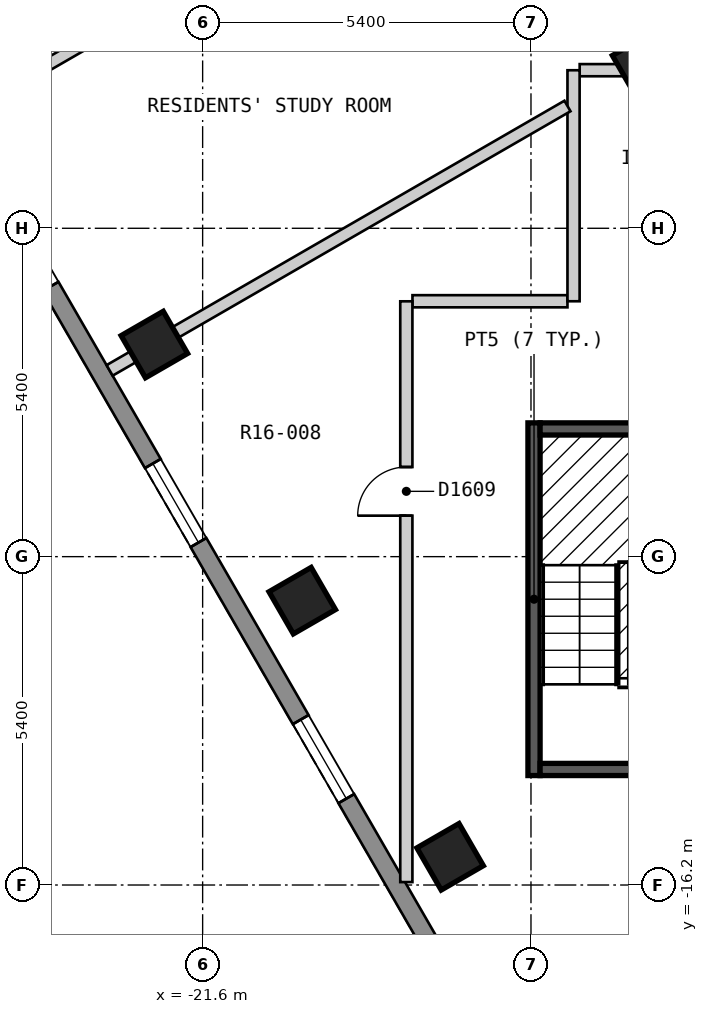
"""IFC4 building model, lengths in metres.
Left out: names, types, materials, properties, quantities, classifications, styles, units other than length and angle.
Written with IfcOpenShell. Run it as: python <this file> out.ifc"""

import sys

from ifc_helpers import new_model, si_unit, direction, frame, frame_2d, origin, origin_2d, place, context, subcontext, project, spatial, polyline, rectangle, outline, extrude, element, fill, save


model = new_model("IFC4")
c1 = context("Model", 3, precision=1e-05, world=origin(), true_north=direction((0.0, 1.0)))
c2 = subcontext(c1, "Body", "Model", "MODEL_VIEW")
j1 = project(units=[si_unit("LENGTHUNIT", "METRE"), si_unit("PLANEANGLEUNIT", "RADIAN")], contexts=[c1])
p1 = place(None, origin())
s1 = spatial("IfcSite", under=j1, at=p1, CompositionType="ELEMENT")
p2 = place(p1, origin())
s2 = spatial("IfcBuilding", under=s1, at=p2, CompositionType="ELEMENT")
p3 = place(p2, frame((0.0, 0.0, 163.2)))
s3 = spatial("IfcBuildingStorey", under=s2, at=p3, CompositionType="ELEMENT", Elevation=163.2)
for number, where, z_axis, x_axis in (
    (1, (-22.394, -7.312, 0.0), (0.0, 0.0, 1.0), (0.5, -0.866, 0.0)),
    (2, (-19.962, -11.524, 0.0), (0.0, 0.0, 1.0), (0.5, -0.866, 0.0)),
    (3, (-17.53, -15.736, 0.0), (0.0, 0.0, 1.0), (0.5, -0.866, 0.0)),
):
    element("IfcColumn", number, at=place(p3, frame(where, z_axis=z_axis, x_axis=x_axis)), inside=s3, PredefinedType="COLUMN", context=c2, shape_type="SweptSolid", body=[
        extrude(rectangle(XDim=0.8, YDim=0.8, at=origin_2d()), origin(), (0.0, 0.0, 1.0), 3.0),
    ])
p4 = place(p3, frame((-14.383, -2.687, 0.0), z_axis=(0.0, 0.0, 1.0), x_axis=(0.5, -0.866025403784, 0.0)))
e4 = element("IfcColumn", 4, at=p4, inside=s3, PredefinedType="COLUMN", context=c2, shape_type="SweptSolid", body=[
    extrude(rectangle(XDim=0.7, YDim=0.7, at=origin_2d()), origin(), (0.0, 0.0, 1.0), 3.0),
])
p5 = place(p3, frame((-26.024, -3.025, 0.0), z_axis=(0.0, 0.0, 1.0), x_axis=(0.500018670445, -0.86601462413, 0.0)))
e5 = element("IfcWall", 5, at=p5, inside=s3, PredefinedType="SOLIDWALL", context=c2, shape_type="SweptSolid", body=[
    extrude(outline(polyline([(0.0, -0.15), (20.785, -0.15), (20.705, 0.15), (0.08, 0.15), (0.0, -0.15)])), origin(), (0.0, 0.0, 1.0), 2.7),
])
p6 = place(p5, frame((2.346, 0.0, 0.15)))
e6 = element("IfcOpeningElement", 6, at=p6, cuts=e5, PredefinedType="OPENING", context=c2, shape_type="SweptSolid", body=[
    extrude(rectangle(XDim=1.5, YDim=2.1, at=frame_2d((0.75, 1.05))), frame((0.0, 0.16, 0.0), z_axis=(0.0, -1.0, 0.0), x_axis=(1.0, 0.0, 0.0)), (0.0, 0.0, 1.0), 0.32),
])
p7 = place(p5, frame((7.21, 0.0, 0.15)))
e7 = element("IfcOpeningElement", 7, at=p7, cuts=e5, PredefinedType="OPENING", context=c2, shape_type="SweptSolid", body=[
    extrude(rectangle(XDim=1.5, YDim=2.1, at=frame_2d((0.75, 1.05))), frame((0.0, 0.16, 0.0), z_axis=(0.0, -1.0, 0.0), x_axis=(1.0, 0.0, 0.0)), (0.0, 0.0, 1.0), 0.32),
])
p8 = place(p5, frame((12.073, 0.0, 0.15)))
e8 = element("IfcOpeningElement", 8, at=p8, cuts=e5, PredefinedType="OPENING", context=c2, shape_type="SweptSolid", body=[
    extrude(rectangle(XDim=1.5, YDim=2.1, at=frame_2d((0.75, 1.05))), frame((0.0, 0.16, 0.0), z_axis=(0.0, -1.0, 0.0), x_axis=(1.0, 0.0, 0.0)), (0.0, 0.0, 1.0), 0.32),
])
p9 = place(p5, frame((16.938, 0.0, 0.15)))
e9 = element("IfcOpeningElement", 9, at=p9, cuts=e5, PredefinedType="OPENING", context=c2, shape_type="SweptSolid", body=[
    extrude(rectangle(XDim=1.5, YDim=2.1, at=frame_2d((0.75, 1.05))), frame((0.0, 0.16, 0.0), z_axis=(0.0, -1.0, 0.0), x_axis=(1.0, 0.0, 0.0)), (0.0, 0.0, 1.0), 0.32),
])
p10 = place(p3, frame((-15.53, -0.701, 0.0), z_axis=(0.0, 0.0, 1.0), x_axis=(0.499972710878, -0.866041158593, 0.0)))
e10 = element("IfcWall", 10, at=p10, inside=s3, PredefinedType="PARTITIONING", context=c2, shape_type="SweptSolid", body=[
    extrude(rectangle(XDim=2.308, YDim=0.2, at=frame_2d((1.154, 0.0))), origin(), (0.0, 0.0, 1.0), 2.7),
])
p11 = place(p10, frame((0.674, 0.0, 0.0)))
e11 = element("IfcOpeningElement", 11, at=p11, cuts=e10, PredefinedType="OPENING", context=c2, shape_type="SweptSolid", body=[
    extrude(rectangle(XDim=0.8, YDim=2.1, at=frame_2d((0.4, 1.05))), frame((0.0, 0.11, 0.0), z_axis=(0.0, -1.0, 0.0), x_axis=(1.0, 0.0, 0.0)), (0.0, 0.0, 1.0), 0.22),
])
p12 = place(p3, frame((-18.149, -6.6, 0.0), z_axis=(0.0, 0.0, 1.0), x_axis=(1.0, 0.0, 0.0)))
e12 = element("IfcWall", 12, at=p12, inside=s3, PredefinedType="PARTITIONING", context=c2, shape_type="SweptSolid", body=[
    extrude(rectangle(XDim=2.549, YDim=0.2, at=frame_2d((1.274, 0.0))), origin(), (0.0, 0.0, 1.0), 2.7),
])
p13 = place(p3, frame((-15.399, -2.8, 0.0), z_axis=(0.0, 0.0, 1.0), x_axis=(1.0, 0.0, 0.0)))
e13 = element("IfcWall", 13, at=p13, inside=s3, PredefinedType="PARTITIONING", context=c2, shape_type="SweptSolid", body=[
    extrude(rectangle(XDim=1.081, YDim=0.2, at=frame_2d((0.541, 0.0))), origin(), (0.0, 0.0, 1.0), 2.7),
])
p14 = place(p3, frame((-15.5, -6.6, 0.0), z_axis=(0.0, 0.0, 1.0), x_axis=(0.0, 1.0, 0.0)))
e14 = element("IfcWall", 14, at=p14, inside=s3, PredefinedType="PARTITIONING", context=c2, shape_type="SweptSolid", body=[
    extrude(rectangle(XDim=3.799, YDim=0.2, at=frame_2d((1.899, 0.0))), origin(), (0.0, 0.0, 1.0), 2.7),
])
p15 = place(p3, frame((-18.25, -16.152, 0.0), z_axis=(0.0, 0.0, 1.0), x_axis=(0.0, 1.0, 0.0)))
e15 = element("IfcWall", 15, at=p15, inside=s3, PredefinedType="PARTITIONING", context=c2, shape_type="SweptSolid", body=[
    extrude(rectangle(XDim=9.551, YDim=0.2, at=frame_2d((4.775, 0.0))), origin(), (0.0, 0.0, 1.0), 2.7),
])
p16 = place(p15, frame((6.026, 0.0, 0.0)))
e16 = element("IfcOpeningElement", 16, at=p16, cuts=e15, PredefinedType="OPENING", context=c2, shape_type="SweptSolid", body=[
    extrude(rectangle(XDim=0.8, YDim=2.1, at=frame_2d((0.4, 1.05))), frame((0.0, 0.11, 0.0), z_axis=(0.0, -1.0, 0.0), x_axis=(1.0, 0.0, 0.0)), (0.0, 0.0, 1.0), 0.22),
])
p17 = place(p3, frame((-23.13, -7.737, 0.0), z_axis=(0.0, 0.0, 1.0), x_axis=(0.86598451299, 0.500070818246, 0.0)))
e17 = element("IfcWall", 17, at=p17, inside=s3, PredefinedType="PARTITIONING", context=c2, shape_type="SweptSolid", body=[
    extrude(rectangle(XDim=8.695, YDim=0.2, at=frame_2d((4.348, 0.0))), origin(), (0.0, 0.0, 1.0), 2.7),
])
p18 = place(p3, frame((-25.563, -3.524, 0.0), z_axis=(0.0, 0.0, 1.0), x_axis=(0.866128586522, 0.499821239653, 0.0)))
e18 = element("IfcWall", 18, at=p18, inside=s3, PredefinedType="PARTITIONING", context=c2, shape_type="SweptSolid", body=[
    extrude(rectangle(XDim=5.848, YDim=0.2, at=frame_2d((2.924, 0.0))), origin(), (0.0, 0.0, 1.0), 2.7),
])
p19 = place(p3, frame((-16.15, -14.4, 0.0), z_axis=(0.0, 0.0, 1.0), x_axis=(0.0, 1.0, 0.0)))
e19 = element("IfcWall", 19, at=p19, inside=s3, PredefinedType="SOLIDWALL", context=c2, shape_type="SweptSolid", body=[
    extrude(rectangle(XDim=5.8, YDim=0.2, at=frame_2d((2.9, 0.0))), origin(), (0.0, 0.0, 1.0), 2.7),
])
for number, where, z_axis, x_axis in (
    (20, (-16.05, -14.3, 0.0), (0.0, 0.0, 1.0), (1.0, 0.0, 0.0)),
    (21, (-16.05, -8.7, 0.0), (0.0, 0.0, 1.0), (1.0, 0.0, 0.0)),
):
    element("IfcWall", number, at=place(p3, frame(where, z_axis=z_axis, x_axis=x_axis)), inside=s3, PredefinedType="SOLIDWALL", context=c2, shape_type="SweptSolid", body=[
        extrude(rectangle(XDim=2.75, YDim=0.2, at=frame_2d((1.375, 0.0))), origin(), (0.0, 0.0, 1.0), 2.7),
    ])
p20 = place(p6, origin())
e22 = element("IfcWindow", 22, at=p20, inside=s3, PartitioningType="SINGLE_PANEL", PredefinedType="WINDOW", context=c2, shape_type="SweptSolid", body=[
    extrude(rectangle(XDim=1.5, YDim=2.1, at=frame_2d((0.75, 1.05))), frame((0.0, 0.03, 0.0), z_axis=(0.0, -1.0, 0.0), x_axis=(1.0, 0.0, 0.0)), (0.0, 0.0, 1.0), 0.06),
])
fill(e6, e22)
p21 = place(p7, origin())
e23 = element("IfcWindow", 23, at=p21, inside=s3, PartitioningType="SINGLE_PANEL", PredefinedType="WINDOW", context=c2, shape_type="SweptSolid", body=[
    extrude(rectangle(XDim=1.5, YDim=2.1, at=frame_2d((0.75, 1.05))), frame((0.0, 0.03, 0.0), z_axis=(0.0, -1.0, 0.0), x_axis=(1.0, 0.0, 0.0)), (0.0, 0.0, 1.0), 0.06),
])
fill(e7, e23)
p22 = place(p8, origin())
e24 = element("IfcWindow", 24, at=p22, inside=s3, PartitioningType="SINGLE_PANEL", PredefinedType="WINDOW", context=c2, shape_type="SweptSolid", body=[
    extrude(rectangle(XDim=1.5, YDim=2.1, at=frame_2d((0.75, 1.05))), frame((0.0, 0.03, 0.0), z_axis=(0.0, -1.0, 0.0), x_axis=(1.0, 0.0, 0.0)), (0.0, 0.0, 1.0), 0.06),
])
fill(e8, e24)
p23 = place(p16, origin())
e25 = element("IfcDoor", 25, at=p23, inside=s3, OperationType="SINGLE_SWING_LEFT", PredefinedType="DOOR", context=c2, shape_type="SweptSolid", body=[
    extrude(rectangle(XDim=0.8, YDim=2.1, at=frame_2d((0.4, 1.05))), frame((0.0, 0.025, 0.0), z_axis=(0.0, -1.0, 0.0), x_axis=(1.0, 0.0, 0.0)), (0.0, 0.0, 1.0), 0.05),
])
fill(e16, e25)
save(model, sys.argv[1])
